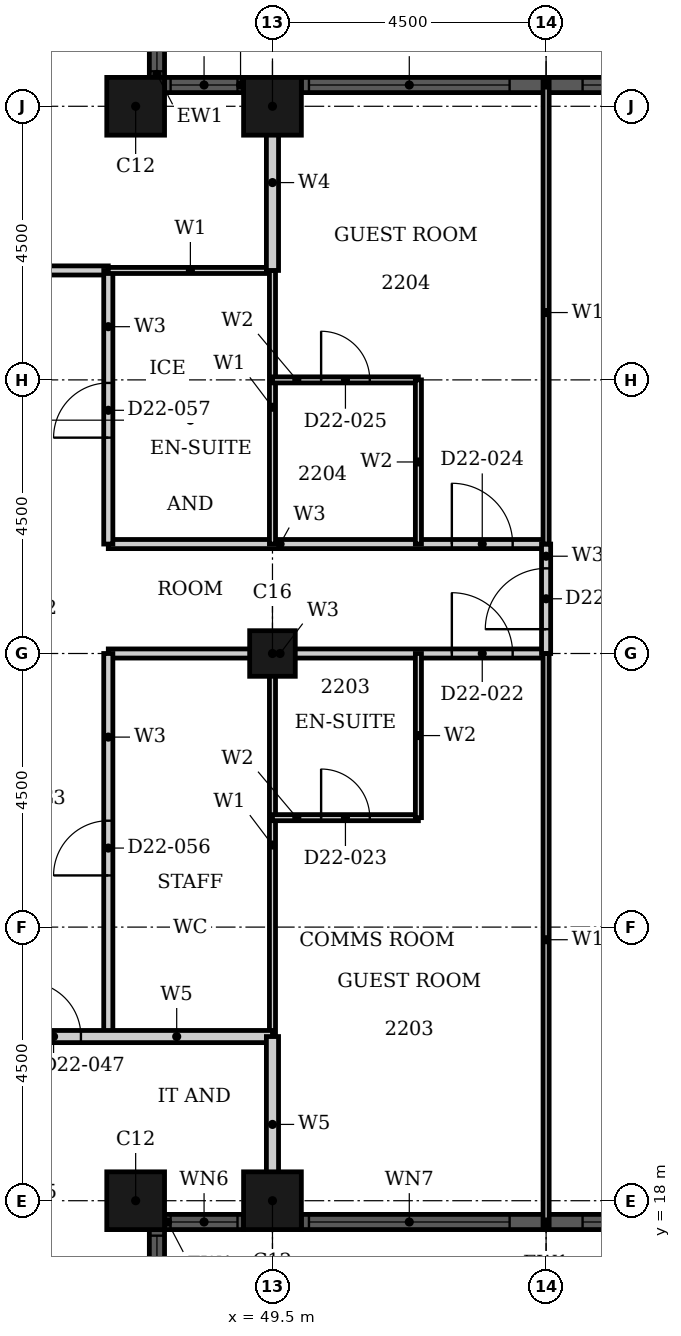
"""IFC4 building model, lengths in metres.
Left out: names, types, materials, properties, quantities, classifications, styles, units other than length and angle.
Written with IfcOpenShell. Run it as: python <this file> out.ifc"""

import sys

from ifc_helpers import new_model, si_unit, direction, frame, frame_2d, origin, origin_2d, place, context, subcontext, project, spatial, rectangle, hollow_rectangle, extrude, element, fill, save


model = new_model("IFC4")
c1 = context("Model", 3, precision=1e-05, world=origin(), true_north=direction((0.0, 1.0)))
c2 = subcontext(c1, "Body", "Model", "MODEL_VIEW")
j1 = project(units=[si_unit("LENGTHUNIT", "METRE"), si_unit("PLANEANGLEUNIT", "RADIAN")], contexts=[c1])
p1 = place(None, origin())
s1 = spatial("IfcSite", under=j1, at=p1, CompositionType="ELEMENT")
p2 = place(p1, origin())
s2 = spatial("IfcBuilding", under=s1, at=p2, CompositionType="ELEMENT")
p3 = place(p2, frame((0.0, 0.0, 92.4)))
s3 = spatial("IfcBuildingStorey", under=s2, at=p3, CompositionType="ELEMENT", Elevation=92.4)
for number, where, z_axis, x_axis in (
    (1, (47.25, 18.0, 0.0), (0.0, 0.0, 1.0), (1.0, 0.0, 0.0)),
    (2, (49.5, 18.0, 0.0), (0.0, 0.0, 1.0), (1.0, 0.0, 0.0)),
    (3, (49.5, 36.0, 0.0), (0.0, 0.0, 1.0), (1.0, 0.0, 0.0)),
    (4, (47.25, 36.0, 0.0), (0.0, 0.0, 1.0), (1.0, 0.0, 0.0)),
):
    element("IfcColumn", number, at=place(p3, frame(where, z_axis=z_axis, x_axis=x_axis)), inside=s3, PredefinedType="COLUMN", context=c2, shape_type="SweptSolid", body=[
        extrude(hollow_rectangle(XDim=0.95, YDim=0.95, WallThickness=0.03, at=origin_2d()), origin(), (0.0, 0.0, 1.0), 3.6),
    ])
p4 = place(p3, frame((49.5, 27.0, 0.0), z_axis=(0.0, 0.0, 1.0), x_axis=(1.0, 0.0, 0.0)))
e5 = element("IfcColumn", 5, at=p4, inside=s3, PredefinedType="COLUMN", context=c2, shape_type="SweptSolid", body=[
    extrude(hollow_rectangle(XDim=0.75, YDim=0.75, WallThickness=0.024, at=origin_2d()), origin(), (0.0, 0.0, 1.0), 3.6),
])
p5 = place(p3, frame((47.6, 16.225, 0.0), z_axis=(0.0, 0.0, 1.0), x_axis=(0.0, 1.0, 0.0)))
e6 = element("IfcWall", 6, at=p5, inside=s3, PredefinedType="SOLIDWALL", context=c2, shape_type="SweptSolid", body=[
    extrude(rectangle(XDim=1.3, YDim=0.25, at=frame_2d((0.65, 0.0))), origin(), (0.0, 0.0, 1.0), 3.6),
])
p6 = place(p5, frame((0.1, 0.0, 0.9)))
e7 = element("IfcOpeningElement", 7, at=p6, cuts=e6, PredefinedType="OPENING", context=c2, shape_type="SweptSolid", body=[
    extrude(rectangle(XDim=1.1, YDim=1.85, at=frame_2d((0.55, 0.925))), frame((0.0, 0.135, 0.0), z_axis=(0.0, -1.0, 0.0), x_axis=(1.0, 0.0, 0.0)), (0.0, 0.0, 1.0), 0.27),
])
p7 = place(p3, frame((47.725, 17.65, 0.0), z_axis=(0.0, 0.0, 1.0), x_axis=(1.0, 0.0, 0.0)))
e8 = element("IfcWall", 8, at=p7, inside=s3, PredefinedType="SOLIDWALL", context=c2, shape_type="SweptSolid", body=[
    extrude(rectangle(XDim=1.3, YDim=0.25, at=frame_2d((0.65, 0.0))), origin(), (0.0, 0.0, 1.0), 3.6),
])
p8 = place(p7, frame((0.1, 0.0, 0.9)))
e9 = element("IfcOpeningElement", 9, at=p8, cuts=e8, PredefinedType="OPENING", context=c2, shape_type="SweptSolid", body=[
    extrude(rectangle(XDim=1.1, YDim=1.85, at=frame_2d((0.55, 0.925))), frame((0.0, 0.135, 0.0), z_axis=(0.0, -1.0, 0.0), x_axis=(1.0, 0.0, 0.0)), (0.0, 0.0, 1.0), 0.27),
])
p9 = place(p3, frame((49.975, 17.65, 0.0), z_axis=(0.0, 0.0, 1.0), x_axis=(1.0, 0.0, 0.0)))
e10 = element("IfcWall", 10, at=p9, inside=s3, PredefinedType="SOLIDWALL", context=c2, shape_type="SweptSolid", body=[
    extrude(rectangle(XDim=8.05, YDim=0.25, at=frame_2d((4.025, 0.0))), origin(), (0.0, 0.0, 1.0), 3.6),
])
p10 = place(p9, frame((0.125, 0.0, 0.9)))
e11 = element("IfcOpeningElement", 11, at=p10, cuts=e10, PredefinedType="OPENING", context=c2, shape_type="SweptSolid", body=[
    extrude(rectangle(XDim=3.3, YDim=1.85, at=frame_2d((1.65, 0.925))), frame((0.0, 0.135, 0.0), z_axis=(0.0, -1.0, 0.0), x_axis=(1.0, 0.0, 0.0)), (0.0, 0.0, 1.0), 0.27),
])
p11 = place(p9, frame((4.625, 0.0, 0.9)))
e12 = element("IfcOpeningElement", 12, at=p11, cuts=e10, PredefinedType="OPENING", context=c2, shape_type="SweptSolid", body=[
    extrude(rectangle(XDim=3.3, YDim=1.85, at=frame_2d((1.65, 0.925))), frame((0.0, 0.135, 0.0), z_axis=(0.0, -1.0, 0.0), x_axis=(1.0, 0.0, 0.0)), (0.0, 0.0, 1.0), 0.27),
])
p12 = place(p3, frame((58.025, 36.35, 0.0), z_axis=(0.0, 0.0, 1.0), x_axis=(-1.0, 0.0, 0.0)))
e13 = element("IfcWall", 13, at=p12, inside=s3, PredefinedType="SOLIDWALL", context=c2, shape_type="SweptSolid", body=[
    extrude(rectangle(XDim=8.05, YDim=0.25, at=frame_2d((4.025, 0.0))), origin(), (0.0, 0.0, 1.0), 3.6),
])
p13 = place(p12, frame((0.125, 0.0, 0.9)))
e14 = element("IfcOpeningElement", 14, at=p13, cuts=e13, PredefinedType="OPENING", context=c2, shape_type="SweptSolid", body=[
    extrude(rectangle(XDim=3.3, YDim=1.85, at=frame_2d((1.65, 0.925))), frame((0.0, 0.135, 0.0), z_axis=(0.0, -1.0, 0.0), x_axis=(1.0, 0.0, 0.0)), (0.0, 0.0, 1.0), 0.27),
])
p14 = place(p12, frame((4.625, 0.0, 0.9)))
e15 = element("IfcOpeningElement", 15, at=p14, cuts=e13, PredefinedType="OPENING", context=c2, shape_type="SweptSolid", body=[
    extrude(rectangle(XDim=3.3, YDim=1.85, at=frame_2d((1.65, 0.925))), frame((0.0, 0.135, 0.0), z_axis=(0.0, -1.0, 0.0), x_axis=(1.0, 0.0, 0.0)), (0.0, 0.0, 1.0), 0.27),
])
p15 = place(p3, frame((49.025, 36.35, 0.0), z_axis=(0.0, 0.0, 1.0), x_axis=(-1.0, 0.0, 0.0)))
e16 = element("IfcWall", 16, at=p15, inside=s3, PredefinedType="SOLIDWALL", context=c2, shape_type="SweptSolid", body=[
    extrude(rectangle(XDim=1.3, YDim=0.25, at=frame_2d((0.65, 0.0))), origin(), (0.0, 0.0, 1.0), 3.6),
])
p16 = place(p15, frame((0.1, 0.0, 0.9)))
e17 = element("IfcOpeningElement", 17, at=p16, cuts=e16, PredefinedType="OPENING", context=c2, shape_type="SweptSolid", body=[
    extrude(rectangle(XDim=1.1, YDim=1.85, at=frame_2d((0.55, 0.925))), frame((0.0, 0.135, 0.0), z_axis=(0.0, -1.0, 0.0), x_axis=(1.0, 0.0, 0.0)), (0.0, 0.0, 1.0), 0.27),
])
p17 = place(p3, frame((47.6, 36.475, 0.0), z_axis=(0.0, 0.0, 1.0), x_axis=(0.0, 1.0, 0.0)))
e18 = element("IfcWall", 18, at=p17, inside=s3, PredefinedType="SOLIDWALL", context=c2, shape_type="SweptSolid", body=[
    extrude(rectangle(XDim=1.3, YDim=0.25, at=frame_2d((0.65, 0.0))), origin(), (0.0, 0.0, 1.0), 3.6),
])
p18 = place(p17, frame((0.1, 0.0, 0.9)))
e19 = element("IfcOpeningElement", 19, at=p18, cuts=e18, PredefinedType="OPENING", context=c2, shape_type="SweptSolid", body=[
    extrude(rectangle(XDim=1.1, YDim=1.85, at=frame_2d((0.55, 0.925))), frame((0.0, 0.135, 0.0), z_axis=(0.0, -1.0, 0.0), x_axis=(1.0, 0.0, 0.0)), (0.0, 0.0, 1.0), 0.27),
])
p19 = place(p3, frame((46.8, 27.0, 0.0), z_axis=(0.0, 0.0, 1.0), x_axis=(1.0, 0.0, 0.0)))
e20 = element("IfcWall", 20, at=p19, inside=s3, PredefinedType="PARTITIONING", context=c2, shape_type="SweptSolid", body=[
    extrude(rectangle(XDim=7.2, YDim=0.15, at=frame_2d((3.6, 0.0))), origin(), (0.0, 0.0, 1.0), 2.48),
])
p20 = place(p19, frame((5.65, 0.0, 0.0)))
e21 = element("IfcOpeningElement", 21, at=p20, cuts=e20, PredefinedType="OPENING", context=c2, shape_type="SweptSolid", body=[
    extrude(rectangle(XDim=1.0, YDim=2.1, at=frame_2d((0.5, 1.05))), frame((0.0, 0.085, 0.0), z_axis=(0.0, -1.0, 0.0), x_axis=(1.0, 0.0, 0.0)), (0.0, 0.0, 1.0), 0.17),
])
p21 = place(p3, frame((46.8, 28.8, 0.0), z_axis=(0.0, 0.0, 1.0), x_axis=(1.0, 0.0, 0.0)))
e22 = element("IfcWall", 22, at=p21, inside=s3, PredefinedType="PARTITIONING", context=c2, shape_type="SweptSolid", body=[
    extrude(rectangle(XDim=7.2, YDim=0.15, at=frame_2d((3.6, 0.0))), origin(), (0.0, 0.0, 1.0), 3.2),
])
p22 = place(p21, frame((5.65, 0.0, 0.0)))
e23 = element("IfcOpeningElement", 23, at=p22, cuts=e22, PredefinedType="OPENING", context=c2, shape_type="SweptSolid", body=[
    extrude(rectangle(XDim=1.0, YDim=2.1, at=frame_2d((0.5, 1.05))), frame((0.0, 0.085, 0.0), z_axis=(0.0, -1.0, 0.0), x_axis=(1.0, 0.0, 0.0)), (0.0, 0.0, 1.0), 0.17),
])
p23 = place(p3, frame((33.3, 33.3, 0.0), z_axis=(0.0, 0.0, 1.0), x_axis=(1.0, 0.0, 0.0)))
e24 = element("IfcWall", 24, at=p23, inside=s3, PredefinedType="PARTITIONING", context=c2, shape_type="SweptSolid", body=[
    extrude(rectangle(XDim=13.5, YDim=0.15, at=frame_2d((6.75, 0.0))), origin(), (0.0, 0.0, 1.0), 3.2),
])
p24 = place(p23, frame((10.15, 0.0, 0.0)))
e25 = element("IfcOpeningElement", 25, at=p24, cuts=e24, PredefinedType="OPENING", context=c2, shape_type="SweptSolid", body=[
    extrude(rectangle(XDim=1.0, YDim=2.1, at=frame_2d((0.5, 1.05))), frame((0.0, 0.085, 0.0), z_axis=(0.0, -1.0, 0.0), x_axis=(1.0, 0.0, 0.0)), (0.0, 0.0, 1.0), 0.17),
])
p25 = place(p23, frame((3.15, 0.0, 0.0)))
e26 = element("IfcOpeningElement", 26, at=p25, cuts=e24, PredefinedType="OPENING", context=c2, shape_type="SweptSolid", body=[
    extrude(rectangle(XDim=0.9, YDim=2.1, at=frame_2d((0.45, 1.05))), frame((0.0, 0.085, 0.0), z_axis=(0.0, -1.0, 0.0), x_axis=(1.0, 0.0, 0.0)), (0.0, 0.0, 1.0), 0.17),
])
p26 = place(p3, frame((46.8, 28.8, 0.0), z_axis=(0.0, 0.0, 1.0), x_axis=(0.0, 1.0, 0.0)))
e27 = element("IfcWall", 27, at=p26, inside=s3, PredefinedType="PARTITIONING", context=c2, shape_type="SweptSolid", body=[
    extrude(rectangle(XDim=4.5, YDim=0.15, at=frame_2d((2.25, 0.0))), origin(), (0.0, 0.0, 1.0), 3.2),
])
p27 = place(p26, frame((1.75, 0.0, 0.0)))
e28 = element("IfcOpeningElement", 28, at=p27, cuts=e27, PredefinedType="OPENING", context=c2, shape_type="SweptSolid", body=[
    extrude(rectangle(XDim=0.9, YDim=2.1, at=frame_2d((0.45, 1.05))), frame((0.0, 0.085, 0.0), z_axis=(0.0, -1.0, 0.0), x_axis=(1.0, 0.0, 0.0)), (0.0, 0.0, 1.0), 0.17),
])
p28 = place(p3, frame((46.8, 20.7, 0.0), z_axis=(0.0, 0.0, 1.0), x_axis=(0.0, 1.0, 0.0)))
e29 = element("IfcWall", 29, at=p28, inside=s3, PredefinedType="PARTITIONING", context=c2, shape_type="SweptSolid", body=[
    extrude(rectangle(XDim=6.3, YDim=0.15, at=frame_2d((3.15, 0.0))), origin(), (0.0, 0.0, 1.0), 3.2),
])
p29 = place(p28, frame((2.65, 0.0, 0.0)))
e30 = element("IfcOpeningElement", 30, at=p29, cuts=e29, PredefinedType="OPENING", context=c2, shape_type="SweptSolid", body=[
    extrude(rectangle(XDim=0.9, YDim=2.1, at=frame_2d((0.45, 1.05))), frame((0.0, 0.085, 0.0), z_axis=(0.0, -1.0, 0.0), x_axis=(1.0, 0.0, 0.0)), (0.0, 0.0, 1.0), 0.17),
])
p30 = place(p3, frame((54.0, 27.0, 0.0), z_axis=(0.0, 0.0, 1.0), x_axis=(0.0, 1.0, 0.0)))
e31 = element("IfcWall", 31, at=p30, inside=s3, PredefinedType="PARTITIONING", context=c2, shape_type="SweptSolid", body=[
    extrude(rectangle(XDim=1.8, YDim=0.15, at=frame_2d((0.9, 0.0))), origin(), (0.0, 0.0, 1.0), 3.2),
])
p31 = place(p30, frame((0.4, 0.0, 0.0)))
e32 = element("IfcOpeningElement", 32, at=p31, cuts=e31, PredefinedType="OPENING", context=c2, shape_type="SweptSolid", body=[
    extrude(rectangle(XDim=1.0, YDim=2.1, at=frame_2d((0.5, 1.05))), frame((0.0, 0.085, 0.0), z_axis=(0.0, -1.0, 0.0), x_axis=(1.0, 0.0, 0.0)), (0.0, 0.0, 1.0), 0.17),
])
p32 = place(p3, frame((46.8, 33.3, 0.0), z_axis=(0.0, 0.0, 1.0), x_axis=(1.0, 0.0, 0.0)))
e33 = element("IfcWall", 33, at=p32, inside=s3, PredefinedType="PARTITIONING", context=c2, shape_type="SweptSolid", body=[
    extrude(rectangle(XDim=2.7, YDim=0.1, at=frame_2d((1.35, 0.0))), origin(), (0.0, 0.0, 1.0), 3.2),
])
p33 = place(p3, frame((49.5, 28.8, 0.0), z_axis=(0.0, 0.0, 1.0), x_axis=(0.0, 1.0, 0.0)))
e34 = element("IfcWall", 34, at=p33, inside=s3, PredefinedType="PARTITIONING", context=c2, shape_type="SweptSolid", body=[
    extrude(rectangle(XDim=4.5, YDim=0.1, at=frame_2d((2.25, 0.0))), origin(), (0.0, 0.0, 1.0), 2.28),
])
p34 = place(p3, frame((49.5, 20.7, 0.0), z_axis=(0.0, 0.0, 1.0), x_axis=(0.0, 1.0, 0.0)))
e35 = element("IfcWall", 35, at=p34, inside=s3, PredefinedType="PARTITIONING", context=c2, shape_type="SweptSolid", body=[
    extrude(rectangle(XDim=6.3, YDim=0.1, at=frame_2d((3.15, 0.0))), origin(), (0.0, 0.0, 1.0), 2.28),
])
p35 = place(p3, frame((54.0, 28.8, 0.0), z_axis=(0.0, 0.0, 1.0), x_axis=(0.0, 1.0, 0.0)))
e36 = element("IfcWall", 36, at=p35, inside=s3, PredefinedType="PARTITIONING", context=c2, shape_type="SweptSolid", body=[
    extrude(rectangle(XDim=7.615, YDim=0.1, at=frame_2d((3.808, 0.0))), origin(), (0.0, 0.0, 1.0), 3.2),
])
p36 = place(p3, frame((54.0, 17.585, 0.0), z_axis=(0.0, 0.0, 1.0), x_axis=(0.0, 1.0, 0.0)))
e37 = element("IfcWall", 37, at=p36, inside=s3, PredefinedType="PARTITIONING", context=c2, shape_type="SweptSolid", body=[
    extrude(rectangle(XDim=9.415, YDim=0.1, at=frame_2d((4.708, 0.0))), origin(), (0.0, 0.0, 1.0), 3.2),
])
p37 = place(p3, frame((49.5, 33.3, 0.0), z_axis=(0.0, 0.0, 1.0), x_axis=(0.0, 1.0, 0.0)))
e38 = element("IfcWall", 38, at=p37, inside=s3, PredefinedType="PARTITIONING", context=c2, shape_type="SweptSolid", body=[
    extrude(rectangle(XDim=2.89, YDim=0.2, at=frame_2d((1.445, 0.0))), origin(), (0.0, 0.0, 1.0), 2.28),
])
p38 = place(p3, frame((49.5, 24.3, 0.0), z_axis=(0.0, 0.0, 1.0), x_axis=(1.0, 0.0, 0.0)))
e39 = element("IfcWall", 39, at=p38, inside=s3, PredefinedType="PARTITIONING", context=c2, shape_type="SweptSolid", body=[
    extrude(rectangle(XDim=2.4, YDim=0.1, at=frame_2d((1.2, 0.0))), origin(), (0.0, 0.0, 1.0), 3.2),
])
p39 = place(p38, frame((0.8, 0.0, 0.0)))
e40 = element("IfcOpeningElement", 40, at=p39, cuts=e39, PredefinedType="OPENING", context=c2, shape_type="SweptSolid", body=[
    extrude(rectangle(XDim=0.8, YDim=2.1, at=frame_2d((0.4, 1.05))), frame((0.0, 0.06, 0.0), z_axis=(0.0, -1.0, 0.0), x_axis=(1.0, 0.0, 0.0)), (0.0, 0.0, 1.0), 0.12),
])
p40 = place(p3, frame((49.5, 31.5, 0.0), z_axis=(0.0, 0.0, 1.0), x_axis=(1.0, 0.0, 0.0)))
e41 = element("IfcWall", 41, at=p40, inside=s3, PredefinedType="PARTITIONING", context=c2, shape_type="SweptSolid", body=[
    extrude(rectangle(XDim=2.4, YDim=0.1, at=frame_2d((1.2, 0.0))), origin(), (0.0, 0.0, 1.0), 2.48),
])
p41 = place(p40, frame((0.8, 0.0, 0.0)))
e42 = element("IfcOpeningElement", 42, at=p41, cuts=e41, PredefinedType="OPENING", context=c2, shape_type="SweptSolid", body=[
    extrude(rectangle(XDim=0.8, YDim=2.1, at=frame_2d((0.4, 1.05))), frame((0.0, 0.06, 0.0), z_axis=(0.0, -1.0, 0.0), x_axis=(1.0, 0.0, 0.0)), (0.0, 0.0, 1.0), 0.12),
])
for number, where, z_axis, x_axis in (
    (43, (51.9, 28.8, 0.0), (0.0, 0.0, 1.0), (0.0, 1.0, 0.0)),
    (44, (51.9, 24.3, 0.0), (0.0, 0.0, 1.0), (0.0, 1.0, 0.0)),
):
    element("IfcWall", number, at=place(p3, frame(where, z_axis=z_axis, x_axis=x_axis)), inside=s3, PredefinedType="PARTITIONING", context=c2, shape_type="SweptSolid", body=[
        extrude(rectangle(XDim=2.7, YDim=0.1, at=frame_2d((1.35, 0.0))), origin(), (0.0, 0.0, 1.0), 3.2),
    ])
p42 = place(p3, frame((45.0, 20.7, 0.0), z_axis=(0.0, 0.0, 1.0), x_axis=(1.0, 0.0, 0.0)))
e45 = element("IfcWall", 45, at=p42, inside=s3, PredefinedType="PARTITIONING", context=c2, shape_type="SweptSolid", body=[
    extrude(rectangle(XDim=4.5, YDim=0.2, at=frame_2d((2.25, 0.0))), origin(), (0.0, 0.0, 1.0), 3.2),
])
p43 = place(p42, frame((0.45, 0.0, 0.0)))
e46 = element("IfcOpeningElement", 46, at=p43, cuts=e45, PredefinedType="OPENING", context=c2, shape_type="SweptSolid", body=[
    extrude(rectangle(XDim=0.9, YDim=2.1, at=frame_2d((0.45, 1.05))), frame((0.0, 0.11, 0.0), z_axis=(0.0, -1.0, 0.0), x_axis=(1.0, 0.0, 0.0)), (0.0, 0.0, 1.0), 0.22),
])
p44 = place(p3, frame((49.5, 17.81, 0.0), z_axis=(0.0, 0.0, 1.0), x_axis=(0.0, 1.0, 0.0)))
e47 = element("IfcWall", 47, at=p44, inside=s3, PredefinedType="PARTITIONING", context=c2, shape_type="SweptSolid", body=[
    extrude(rectangle(XDim=2.89, YDim=0.2, at=frame_2d((1.445, 0.0))), origin(), (0.0, 0.0, 1.0), 2.28),
])
p45 = place(p6, origin())
e48 = element("IfcWindow", 48, at=p45, inside=s3, PartitioningType="SINGLE_PANEL", PredefinedType="WINDOW", context=c2, shape_type="SweptSolid", body=[
    extrude(rectangle(XDim=1.1, YDim=1.85, at=frame_2d((0.55, 0.925))), frame((0.0, 0.03, 0.0), z_axis=(0.0, -1.0, 0.0), x_axis=(1.0, 0.0, 0.0)), (0.0, 0.0, 1.0), 0.06),
])
fill(e7, e48)
p46 = place(p8, origin())
e49 = element("IfcWindow", 49, at=p46, inside=s3, PartitioningType="SINGLE_PANEL", PredefinedType="WINDOW", context=c2, shape_type="SweptSolid", body=[
    extrude(rectangle(XDim=1.1, YDim=1.85, at=frame_2d((0.55, 0.925))), frame((0.0, 0.03, 0.0), z_axis=(0.0, -1.0, 0.0), x_axis=(1.0, 0.0, 0.0)), (0.0, 0.0, 1.0), 0.06),
])
fill(e9, e49)
p47 = place(p10, origin())
e50 = element("IfcWindow", 50, at=p47, inside=s3, PartitioningType="SINGLE_PANEL", PredefinedType="WINDOW", context=c2, shape_type="SweptSolid", body=[
    extrude(rectangle(XDim=3.3, YDim=1.85, at=frame_2d((1.65, 0.925))), frame((0.0, 0.03, 0.0), z_axis=(0.0, -1.0, 0.0), x_axis=(1.0, 0.0, 0.0)), (0.0, 0.0, 1.0), 0.06),
])
fill(e11, e50)
p48 = place(p11, origin())
e51 = element("IfcWindow", 51, at=p48, inside=s3, PartitioningType="SINGLE_PANEL", PredefinedType="WINDOW", context=c2, shape_type="SweptSolid", body=[
    extrude(rectangle(XDim=3.3, YDim=1.85, at=frame_2d((1.65, 0.925))), frame((0.0, 0.03, 0.0), z_axis=(0.0, -1.0, 0.0), x_axis=(1.0, 0.0, 0.0)), (0.0, 0.0, 1.0), 0.06),
])
fill(e12, e51)
p49 = place(p13, origin())
e52 = element("IfcWindow", 52, at=p49, inside=s3, PartitioningType="SINGLE_PANEL", PredefinedType="WINDOW", context=c2, shape_type="SweptSolid", body=[
    extrude(rectangle(XDim=3.3, YDim=1.85, at=frame_2d((1.65, 0.925))), frame((0.0, 0.03, 0.0), z_axis=(0.0, -1.0, 0.0), x_axis=(1.0, 0.0, 0.0)), (0.0, 0.0, 1.0), 0.06),
])
fill(e14, e52)
p50 = place(p14, origin())
e53 = element("IfcWindow", 53, at=p50, inside=s3, PartitioningType="SINGLE_PANEL", PredefinedType="WINDOW", context=c2, shape_type="SweptSolid", body=[
    extrude(rectangle(XDim=3.3, YDim=1.85, at=frame_2d((1.65, 0.925))), frame((0.0, 0.03, 0.0), z_axis=(0.0, -1.0, 0.0), x_axis=(1.0, 0.0, 0.0)), (0.0, 0.0, 1.0), 0.06),
])
fill(e15, e53)
p51 = place(p16, origin())
e54 = element("IfcWindow", 54, at=p51, inside=s3, PartitioningType="SINGLE_PANEL", PredefinedType="WINDOW", context=c2, shape_type="SweptSolid", body=[
    extrude(rectangle(XDim=1.1, YDim=1.85, at=frame_2d((0.55, 0.925))), frame((0.0, 0.03, 0.0), z_axis=(0.0, -1.0, 0.0), x_axis=(1.0, 0.0, 0.0)), (0.0, 0.0, 1.0), 0.06),
])
fill(e17, e54)
p52 = place(p18, origin())
e55 = element("IfcWindow", 55, at=p52, inside=s3, PartitioningType="SINGLE_PANEL", PredefinedType="WINDOW", context=c2, shape_type="SweptSolid", body=[
    extrude(rectangle(XDim=1.1, YDim=1.85, at=frame_2d((0.55, 0.925))), frame((0.0, 0.03, 0.0), z_axis=(0.0, -1.0, 0.0), x_axis=(1.0, 0.0, 0.0)), (0.0, 0.0, 1.0), 0.06),
])
fill(e19, e55)
p53 = place(p20, origin())
e56 = element("IfcDoor", 56, at=p53, inside=s3, OperationType="SINGLE_SWING_RIGHT", PredefinedType="DOOR", context=c2, shape_type="SweptSolid", body=[
    extrude(rectangle(XDim=1.0, YDim=2.1, at=frame_2d((0.5, 1.05))), frame((0.0, 0.025, 0.0), z_axis=(0.0, -1.0, 0.0), x_axis=(1.0, 0.0, 0.0)), (0.0, 0.0, 1.0), 0.05),
])
fill(e21, e56)
p54 = place(p39, origin())
e57 = element("IfcDoor", 57, at=p54, inside=s3, OperationType="SINGLE_SWING_RIGHT", PredefinedType="DOOR", context=c2, shape_type="SweptSolid", body=[
    extrude(rectangle(XDim=0.8, YDim=2.1, at=frame_2d((0.4, 1.05))), frame((0.0, 0.025, 0.0), z_axis=(0.0, -1.0, 0.0), x_axis=(1.0, 0.0, 0.0)), (0.0, 0.0, 1.0), 0.05),
])
fill(e40, e57)
p55 = place(p22, origin())
e58 = element("IfcDoor", 58, at=p55, inside=s3, OperationType="SINGLE_SWING_RIGHT", PredefinedType="DOOR", context=c2, shape_type="SweptSolid", body=[
    extrude(rectangle(XDim=1.0, YDim=2.1, at=frame_2d((0.5, 1.05))), frame((0.0, 0.025, 0.0), z_axis=(0.0, -1.0, 0.0), x_axis=(1.0, 0.0, 0.0)), (0.0, 0.0, 1.0), 0.05),
])
fill(e23, e58)
p56 = place(p41, origin())
e59 = element("IfcDoor", 59, at=p56, inside=s3, OperationType="SINGLE_SWING_LEFT", PredefinedType="DOOR", context=c2, shape_type="SweptSolid", body=[
    extrude(rectangle(XDim=0.8, YDim=2.1, at=frame_2d((0.4, 1.05))), frame((0.0, 0.025, 0.0), z_axis=(0.0, -1.0, 0.0), x_axis=(1.0, 0.0, 0.0)), (0.0, 0.0, 1.0), 0.05),
])
fill(e42, e59)
p57 = place(p31, origin())
e60 = element("IfcDoor", 60, at=p57, inside=s3, OperationType="SINGLE_SWING_LEFT", PredefinedType="DOOR", context=c2, shape_type="SweptSolid", body=[
    extrude(rectangle(XDim=1.0, YDim=2.1, at=frame_2d((0.5, 1.05))), frame((0.0, 0.025, 0.0), z_axis=(0.0, -1.0, 0.0), x_axis=(1.0, 0.0, 0.0)), (0.0, 0.0, 1.0), 0.05),
])
fill(e32, e60)
p58 = place(p43, origin())
e61 = element("IfcDoor", 61, at=p58, inside=s3, OperationType="SINGLE_SWING_LEFT", PredefinedType="DOOR", context=c2, shape_type="SweptSolid", body=[
    extrude(rectangle(XDim=0.9, YDim=2.1, at=frame_2d((0.45, 1.05))), frame((0.0, 0.025, 0.0), z_axis=(0.0, -1.0, 0.0), x_axis=(1.0, 0.0, 0.0)), (0.0, 0.0, 1.0), 0.05),
])
fill(e46, e61)
p59 = place(p29, origin())
e62 = element("IfcDoor", 62, at=p59, inside=s3, OperationType="SINGLE_SWING_RIGHT", PredefinedType="DOOR", context=c2, shape_type="SweptSolid", body=[
    extrude(rectangle(XDim=0.9, YDim=2.1, at=frame_2d((0.45, 1.05))), frame((0.0, 0.025, 0.0), z_axis=(0.0, -1.0, 0.0), x_axis=(1.0, 0.0, 0.0)), (0.0, 0.0, 1.0), 0.05),
])
fill(e30, e62)
p60 = place(p27, origin())
e63 = element("IfcDoor", 63, at=p60, inside=s3, OperationType="SINGLE_SWING_LEFT", PredefinedType="DOOR", context=c2, shape_type="SweptSolid", body=[
    extrude(rectangle(XDim=0.9, YDim=2.1, at=frame_2d((0.45, 1.05))), frame((0.0, 0.025, 0.0), z_axis=(0.0, -1.0, 0.0), x_axis=(1.0, 0.0, 0.0)), (0.0, 0.0, 1.0), 0.05),
])
fill(e28, e63)
save(model, sys.argv[1])
